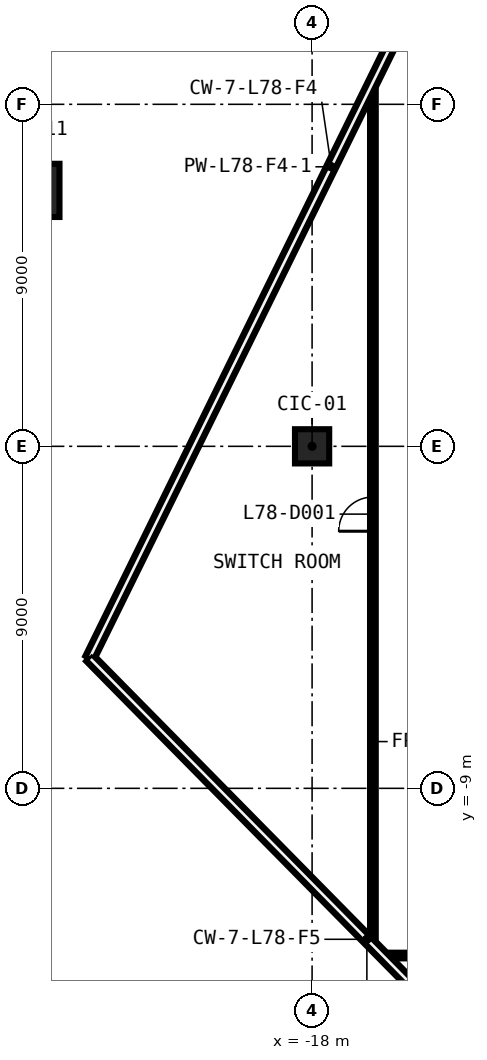
"""IFC4 building model, lengths in metres.
Left out: names, types, materials, properties, quantities, classifications, styles, units other than length and angle.
Written with IfcOpenShell. Run it as: python <this file> out.ifc"""

import sys

from ifc_helpers import new_model, si_unit, direction, frame, frame_2d, origin, origin_2d, place, context, subcontext, project, spatial, rectangle, hollow_rectangle, extrude, element, fill, save


model = new_model("IFC4")
c1 = context("Model", 3, precision=1e-05, world=origin(), true_north=direction((0.0, 1.0)))
c2 = subcontext(c1, "Body", "Model", "MODEL_VIEW")
j1 = project(units=[si_unit("LENGTHUNIT", "METRE"), si_unit("PLANEANGLEUNIT", "RADIAN")], contexts=[c1])
p1 = place(None, origin())
s1 = spatial("IfcSite", under=j1, at=p1, CompositionType="ELEMENT")
p2 = place(p1, origin())
s2 = spatial("IfcBuilding", under=s1, at=p2, CompositionType="ELEMENT")
p3 = place(p2, frame((0.0, 0.0, 363.2)))
s3 = spatial("IfcBuildingStorey", under=s2, at=p3, CompositionType="ELEMENT", Elevation=363.2)
p4 = place(p3, frame((-18.0, 0.0, 0.0), z_axis=(0.0, 0.0, 1.0), x_axis=(1.0, 0.0, 0.0)))
e1 = element("IfcColumn", 1, at=p4, inside=s3, PredefinedType="COLUMN", context=c2, shape_type="SweptSolid", body=[
    extrude(rectangle(XDim=0.9, YDim=0.9, at=origin_2d()), origin(), (0.0, 0.0, 1.0), 3.8),
])
p5 = place(p3, frame((-25.347, 6.735, 0.0), z_axis=(0.0, 0.0, 1.0), x_axis=(1.0, 0.0, 0.0)))
e2 = element("IfcColumn", 2, at=p5, inside=s3, PredefinedType="COLUMN", context=c2, shape_type="SweptSolid", body=[
    extrude(hollow_rectangle(XDim=1.4, YDim=1.4, WallThickness=0.06, at=origin_2d()), origin(), (0.0, 0.0, 1.0), 4.2),
])
p6 = place(p3, frame((14.656, -13.4, 0.0), z_axis=(0.0, 0.0, 1.0), x_axis=(-1.0, 0.0, 0.0)))
e3 = element("IfcWall", 3, at=p6, inside=s3, PredefinedType="PARTITIONING", context=c2, shape_type="SweptSolid", body=[
    extrude(rectangle(XDim=30.765, YDim=0.15, at=frame_2d((15.383, 0.0))), origin(), (0.0, 0.0, 1.0), 3.8),
])
p7 = place(p6, frame((14.933, 0.0, 0.0)))
e4 = element("IfcOpeningElement", 4, at=p7, cuts=e3, PredefinedType="OPENING", context=c2, shape_type="SweptSolid", body=[
    extrude(rectangle(XDim=0.9, YDim=2.1, at=frame_2d((0.45, 1.05))), frame((0.0, 0.085, 0.0), z_axis=(0.0, -1.0, 0.0), x_axis=(1.0, 0.0, 0.0)), (0.0, 0.0, 1.0), 0.17),
])
p8 = place(p3, frame((-16.4, -13.105, 0.0), z_axis=(0.0, 0.0, 1.0), x_axis=(0.0, 1.0, 0.0)))
e5 = element("IfcWall", 5, at=p8, inside=s3, PredefinedType="PARTITIONING", context=c2, shape_type="SweptSolid", body=[
    extrude(rectangle(XDim=22.641, YDim=0.15, at=frame_2d((11.321, 0.0))), origin(), (0.0, 0.0, 1.0), 3.8),
])
p9 = place(p8, frame((10.871, 0.0, 0.0)))
e6 = element("IfcOpeningElement", 6, at=p9, cuts=e5, PredefinedType="OPENING", context=c2, shape_type="SweptSolid", body=[
    extrude(rectangle(XDim=0.9, YDim=2.1, at=frame_2d((0.45, 1.05))), frame((0.0, 0.085, 0.0), z_axis=(0.0, -1.0, 0.0), x_axis=(1.0, 0.0, 0.0)), (0.0, 0.0, 1.0), 0.17),
])
p10 = place(p3, frame((-11.138, 20.28, 0.0), z_axis=(0.0, 0.0, 1.0), x_axis=(-0.441342255748, -0.897338850876, 0.0)))
e7 = element("IfcWall", 7, at=p10, inside=s3, PredefinedType="SOLIDWALL", context=c2, shape_type="SweptSolid", body=[
    extrude(rectangle(XDim=28.805, YDim=0.25, at=frame_2d((14.403, 0.0))), origin(), (0.0, 0.0, 1.0), 3.8),
])
p11 = place(p3, frame((-23.851, -5.568, 0.0), z_axis=(0.0, 0.0, 1.0), x_axis=(0.701718568407, -0.712454244673, 0.0)))
e8 = element("IfcWall", 8, at=p11, inside=s3, PredefinedType="SOLIDWALL", context=c2, shape_type="SweptSolid", body=[
    extrude(rectangle(XDim=20.785, YDim=0.25, at=frame_2d((10.393, 0.0))), origin(), (0.0, 0.0, 1.0), 3.8),
])
p12 = place(p9, origin())
e9 = element("IfcDoor", 9, at=p12, inside=s3, OperationType="SINGLE_SWING_RIGHT", PredefinedType="DOOR", context=c2, shape_type="SweptSolid", body=[
    extrude(rectangle(XDim=0.9, YDim=2.1, at=frame_2d((0.45, 1.05))), frame((0.0, 0.025, 0.0), z_axis=(0.0, -1.0, 0.0), x_axis=(1.0, 0.0, 0.0)), (0.0, 0.0, 1.0), 0.05),
])
fill(e6, e9)
save(model, sys.argv[1])
